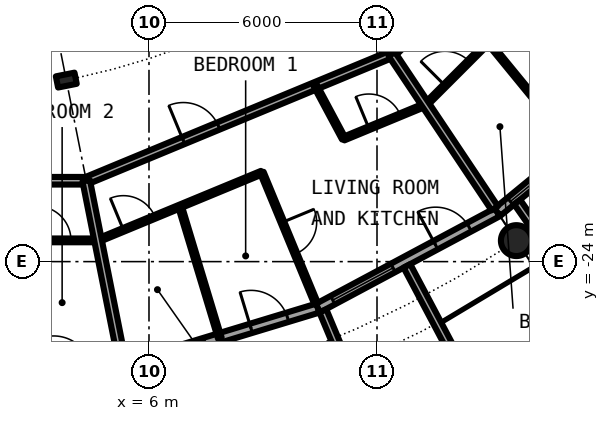
"""IFC4 building model, lengths in metres.
Left out: names, types, materials, properties, quantities, classifications, styles, units other than length and angle.
Written with IfcOpenShell. Run it as: python <this file> out.ifc"""

import sys

from ifc_helpers import new_model, si_unit, direction, frame, frame_2d, origin, origin_2d, place, context, subcontext, project, spatial, rectangle, hollow_circle, i_section, extrude, element, fill, save


model = new_model("IFC4")
c1 = context("Model", 3, precision=1e-05, world=origin(), true_north=direction((0.0, 1.0)))
c2 = subcontext(c1, "Body", "Model", "MODEL_VIEW")
j1 = project(units=[si_unit("LENGTHUNIT", "METRE"), si_unit("PLANEANGLEUNIT", "RADIAN")], contexts=[c1])
p1 = place(None, origin())
s1 = spatial("IfcSite", under=j1, at=p1, CompositionType="ELEMENT")
p2 = place(p1, origin())
s2 = spatial("IfcBuilding", under=s1, at=p2, CompositionType="ELEMENT")
p3 = place(p2, frame((0.0, 0.0, 167.7)))
s3 = spatial("IfcBuildingStorey", under=s2, at=p3, CompositionType="ELEMENT", Elevation=167.7)
p4 = place(p3, frame((15.667, -23.448, 0.0), z_axis=(0.0, 0.0, 1.0), x_axis=(1.0, 0.0, 0.0)))
e1 = element("IfcColumn", 1, at=p4, inside=s3, PredefinedType="COLUMN", context=c2, shape_type="SweptSolid", body=[
    extrude(hollow_circle(Radius=0.406, WallThickness=0.04, at=origin_2d()), origin(), (0.0, 0.0, 1.0), 3.05),
])
p5 = place(p3, frame((3.824, -19.223, 0.0), z_axis=(0.0, 0.0, 1.0), x_axis=(0.195090322016, -0.980785280403, 0.0)))
e2 = element("IfcColumn", 2, at=p5, inside=s3, PredefinedType="COLUMN", context=c2, shape_type="SweptSolid", body=[
    extrude(i_section(OverallWidth=0.3, OverallDepth=0.5, WebThickness=0.014, FlangeThickness=0.028, FilletRadius=0.027, at=origin_2d()), origin(), (0.0, 0.0, 1.0), 3.05),
])
p6 = place(p3, frame((5.326, -26.775, 0.0), z_axis=(0.0, 0.0, 1.0), x_axis=(0.956965678721, 0.290201119486, 0.0)))
e3 = element("IfcWall", 3, at=p6, inside=s3, PredefinedType="SOLIDWALL", context=c2, shape_type="SweptSolid", body=[
    extrude(rectangle(XDim=5.351, YDim=0.25, at=frame_2d((2.676, 0.0))), origin(), (0.0, 0.0, 1.0), 2.7),
])
p7 = place(p6, frame((0.441, 0.0, 0.3)))
e4 = element("IfcOpeningElement", 4, at=p7, cuts=e3, PredefinedType="OPENING", context=c2, shape_type="SweptSolid", body=[
    extrude(rectangle(XDim=1.8, YDim=2.1, at=frame_2d((0.9, 1.05))), frame((0.0, 0.135, 0.0), z_axis=(0.0, -1.0, 0.0), x_axis=(1.0, 0.0, 0.0)), (0.0, 0.0, 1.0), 0.27),
])
p8 = place(p6, frame((3.51, 0.0, 0.0)))
e5 = element("IfcOpeningElement", 5, at=p8, cuts=e3, PredefinedType="OPENING", context=c2, shape_type="SweptSolid", body=[
    extrude(rectangle(XDim=1.0, YDim=2.2, at=frame_2d((0.5, 1.1))), frame((0.0, 0.135, 0.0), z_axis=(0.0, -1.0, 0.0), x_axis=(1.0, 0.0, 0.0)), (0.0, 0.0, 1.0), 0.27),
])
p9 = place(p3, frame((10.447, -25.222, 0.0), z_axis=(0.0, 0.0, 1.0), x_axis=(0.881915646801, 0.471407246368, 0.0)))
e6 = element("IfcWall", 6, at=p9, inside=s3, PredefinedType="SOLIDWALL", context=c2, shape_type="SweptSolid", body=[
    extrude(rectangle(XDim=5.352, YDim=0.25, at=frame_2d((2.676, 0.0))), origin(), (0.0, 0.0, 1.0), 2.7),
])
p10 = place(p9, frame((0.441, 0.0, 0.3)))
e7 = element("IfcOpeningElement", 7, at=p10, cuts=e6, PredefinedType="OPENING", context=c2, shape_type="SweptSolid", body=[
    extrude(rectangle(XDim=1.8, YDim=2.1, at=frame_2d((0.9, 1.05))), frame((0.0, 0.135, 0.0), z_axis=(0.0, -1.0, 0.0), x_axis=(1.0, 0.0, 0.0)), (0.0, 0.0, 1.0), 0.27),
])
p11 = place(p9, frame((3.51, 0.0, 0.0)))
e8 = element("IfcOpeningElement", 8, at=p11, cuts=e6, PredefinedType="OPENING", context=c2, shape_type="SweptSolid", body=[
    extrude(rectangle(XDim=1.0, YDim=2.2, at=frame_2d((0.5, 1.1))), frame((0.0, 0.135, 0.0), z_axis=(0.0, -1.0, 0.0), x_axis=(1.0, 0.0, 0.0)), (0.0, 0.0, 1.0), 0.27),
])
p12 = place(p3, frame((10.575, -25.295, -0.03), z_axis=(0.0, 0.0, 1.0), x_axis=(0.385697364644, -0.922625353492, 0.0)))
e9 = element("IfcWall", 9, at=p12, inside=s3, PredefinedType="SOLIDWALL", context=c2, shape_type="SweptSolid", body=[
    extrude(rectangle(XDim=2.883, YDim=0.2, at=frame_2d((1.442, 0.0))), origin(), (0.0, 0.0, 1.0), 2.73),
])
p13 = place(p3, frame((12.787, -24.113, -0.03), z_axis=(0.0, 0.0, 1.0), x_axis=(0.468365282436, -0.883534924159, 0.0)))
e10 = element("IfcWall", 10, at=p13, inside=s3, PredefinedType="SOLIDWALL", context=c2, shape_type="SweptSolid", body=[
    extrude(rectangle(XDim=3.006, YDim=0.2, at=frame_2d((1.503, 0.0))), origin(), (0.0, 0.0, 1.0), 2.73),
])
p14 = place(p3, frame((15.167, -22.699, 0.0), z_axis=(0.0, 0.0, 1.0), x_axis=(0.773019449054, 0.634382322723, 0.0)))
e11 = element("IfcWall", 11, at=p14, inside=s3, PredefinedType="SOLIDWALL", context=c2, shape_type="SweptSolid", body=[
    extrude(rectangle(XDim=5.352, YDim=0.25, at=frame_2d((2.676, 0.0))), origin(), (0.0, 0.0, 1.0), 2.7),
])
p15 = place(p14, frame((0.441, 0.0, 0.3)))
e12 = element("IfcOpeningElement", 12, at=p15, cuts=e11, PredefinedType="OPENING", context=c2, shape_type="SweptSolid", body=[
    extrude(rectangle(XDim=1.8, YDim=2.1, at=frame_2d((0.9, 1.05))), frame((0.0, 0.135, 0.0), z_axis=(0.0, -1.0, 0.0), x_axis=(1.0, 0.0, 0.0)), (0.0, 0.0, 1.0), 0.27),
])
p16 = place(p14, frame((3.51, 0.0, 0.0)))
e13 = element("IfcOpeningElement", 13, at=p16, cuts=e11, PredefinedType="OPENING", context=c2, shape_type="SweptSolid", body=[
    extrude(rectangle(XDim=1.0, YDim=2.2, at=frame_2d((0.5, 1.1))), frame((0.0, 0.135, 0.0), z_axis=(0.0, -1.0, 0.0), x_axis=(1.0, 0.0, 0.0)), (0.0, 0.0, 1.0), 0.27),
])
p17 = place(p3, frame((15.688, -22.433, -0.03), z_axis=(0.0, 0.0, 1.0), x_axis=(0.573260687834, -0.819373043115, 0.0)))
e14 = element("IfcWall", 14, at=p17, inside=s3, PredefinedType="SOLIDWALL", context=c2, shape_type="SweptSolid", body=[
    extrude(rectangle(XDim=2.925, YDim=0.2, at=frame_2d((1.463, 0.0))), origin(), (0.0, 0.0, 1.0), 2.73),
])
p18 = place(p3, frame((0.0, -23.441, 0.0), z_axis=(0.0, 0.0, 1.0), x_axis=(1.0, 0.0, 0.0)))
e15 = element("IfcWall", 15, at=p18, inside=s3, PredefinedType="PARTITIONING", context=c2, shape_type="SweptSolid", body=[
    extrude(rectangle(XDim=4.663, YDim=0.1, at=frame_2d((2.332, 0.0))), origin(), (0.0, 0.0, 1.0), 2.7),
])
p19 = place(p18, frame((3.047, 0.0, 0.0)))
e16 = element("IfcOpeningElement", 16, at=p19, cuts=e15, PredefinedType="OPENING", context=c2, shape_type="SweptSolid", body=[
    extrude(rectangle(XDim=0.9, YDim=2.3, at=frame_2d((0.45, 1.15))), frame((0.0, 0.06, 0.0), z_axis=(0.0, -1.0, 0.0), x_axis=(1.0, 0.0, 0.0)), (0.0, 0.0, 1.0), 0.12),
])
p20 = place(p3, frame((4.656, -23.442, 0.0), z_axis=(0.0, 0.0, 1.0), x_axis=(0.923994503548, 0.382405749712, 0.0)))
e17 = element("IfcWall", 17, at=p20, inside=s3, PredefinedType="PARTITIONING", context=c2, shape_type="SweptSolid", body=[
    extrude(rectangle(XDim=4.663, YDim=0.1, at=frame_2d((2.331, 0.0))), origin(), (0.0, 0.0, 1.0), 2.7),
])
p21 = place(p20, frame((0.726, 0.0, 0.0)))
e18 = element("IfcOpeningElement", 18, at=p21, cuts=e17, PredefinedType="OPENING", context=c2, shape_type="SweptSolid", body=[
    extrude(rectangle(XDim=0.9, YDim=2.3, at=frame_2d((0.45, 1.15))), frame((0.0, 0.06, 0.0), z_axis=(0.0, -1.0, 0.0), x_axis=(1.0, 0.0, 0.0)), (0.0, 0.0, 1.0), 0.12),
])
p22 = place(p3, frame((11.124, -20.764, 0.0), z_axis=(0.0, 0.0, 1.0), x_axis=(0.923938991376, 0.382539854414, 0.0)))
e19 = element("IfcWall", 19, at=p22, inside=s3, PredefinedType="PARTITIONING", context=c2, shape_type="SweptSolid", body=[
    extrude(rectangle(XDim=2.331, YDim=0.1, at=frame_2d((1.166, 0.0))), origin(), (0.0, 0.0, 1.0), 2.7),
])
p23 = place(p22, frame((0.716, 0.0, 0.0)))
e20 = element("IfcOpeningElement", 20, at=p23, cuts=e19, PredefinedType="OPENING", context=c2, shape_type="SweptSolid", body=[
    extrude(rectangle(XDim=0.9, YDim=2.3, at=frame_2d((0.45, 1.15))), frame((0.0, 0.06, 0.0), z_axis=(0.0, -1.0, 0.0), x_axis=(1.0, 0.0, 0.0)), (0.0, 0.0, 1.0), 0.12),
])
p24 = place(p3, frame((13.285, -19.869, 0.0), z_axis=(0.0, 0.0, 1.0), x_axis=(0.706923494552, 0.707290020325, 0.0)))
e21 = element("IfcWall", 21, at=p24, inside=s3, PredefinedType="PARTITIONING", context=c2, shape_type="SweptSolid", body=[
    extrude(rectangle(XDim=4.663, YDim=0.1, at=frame_2d((2.331, 0.0))), origin(), (0.0, 0.0, 1.0), 2.7),
])
p25 = place(p24, frame((0.712, 0.0, 0.0)))
e22 = element("IfcOpeningElement", 22, at=p25, cuts=e21, PredefinedType="OPENING", context=c2, shape_type="SweptSolid", body=[
    extrude(rectangle(XDim=0.9, YDim=2.3, at=frame_2d((0.45, 1.15))), frame((0.0, 0.06, 0.0), z_axis=(0.0, -1.0, 0.0), x_axis=(1.0, 0.0, 0.0)), (0.0, 0.0, 1.0), 0.12),
])
p26 = place(p3, frame((-4.351, -21.872, 0.0), z_axis=(0.0, 0.0, 1.0), x_axis=(1.0, 0.0, 0.0)))
e23 = element("IfcWall", 23, at=p26, inside=s3, PredefinedType="PARTITIONING", context=c2, shape_type="SweptSolid", body=[
    extrude(rectangle(XDim=8.702, YDim=0.2, at=frame_2d((4.351, 0.0))), origin(), (0.0, 0.0, 1.0), 2.7),
])
p27 = place(p26, frame((4.939, 0.0, 0.0)))
e24 = element("IfcOpeningElement", 24, at=p27, cuts=e23, PredefinedType="OPENING", context=c2, shape_type="SweptSolid", body=[
    extrude(rectangle(XDim=1.0, YDim=2.3, at=frame_2d((0.5, 1.15))), frame((0.0, 0.11, 0.0), z_axis=(0.0, -1.0, 0.0), x_axis=(1.0, 0.0, 0.0)), (0.0, 0.0, 1.0), 0.22),
])
p28 = place(p3, frame((4.351, -21.872, 0.0), z_axis=(0.0, 0.0, 1.0), x_axis=(0.923825356298, 0.382814199136, 0.0)))
e25 = element("IfcWall", 25, at=p28, inside=s3, PredefinedType="PARTITIONING", context=c2, shape_type="SweptSolid", body=[
    extrude(rectangle(XDim=8.704, YDim=0.2, at=frame_2d((4.352, 0.0))), origin(), (0.0, 0.0, 1.0), 2.7),
])
p29 = place(p28, frame((2.763, 0.0, 0.0)))
e26 = element("IfcOpeningElement", 26, at=p29, cuts=e25, PredefinedType="OPENING", context=c2, shape_type="SweptSolid", body=[
    extrude(rectangle(XDim=1.0, YDim=2.3, at=frame_2d((0.5, 1.15))), frame((0.0, 0.11, 0.0), z_axis=(0.0, -1.0, 0.0), x_axis=(1.0, 0.0, 0.0)), (0.0, 0.0, 1.0), 0.22),
])
p30 = place(p3, frame((12.389, -18.542, 0.0), z_axis=(0.0, 0.0, 1.0), x_axis=(0.707106781187, 0.707106781187, 0.0)))
e27 = element("IfcWall", 27, at=p30, inside=s3, PredefinedType="PARTITIONING", context=c2, shape_type="SweptSolid", body=[
    extrude(rectangle(XDim=8.702, YDim=0.2, at=frame_2d((4.351, 0.0))), origin(), (0.0, 0.0, 1.0), 2.7),
])
p31 = place(p30, frame((2.763, 0.0, 0.0)))
e28 = element("IfcOpeningElement", 28, at=p31, cuts=e27, PredefinedType="OPENING", context=c2, shape_type="SweptSolid", body=[
    extrude(rectangle(XDim=1.0, YDim=2.3, at=frame_2d((0.5, 1.15))), frame((0.0, 0.11, 0.0), z_axis=(0.0, -1.0, 0.0), x_axis=(1.0, 0.0, 0.0)), (0.0, 0.0, 1.0), 0.22),
])
p32 = place(p3, frame((4.348, -21.873, 0.0), z_axis=(0.0, 0.0, 1.0), x_axis=(0.194931286287, -0.980816901173, 0.0)))
e29 = element("IfcWall", 29, at=p32, inside=s3, PredefinedType="PARTITIONING", context=c2, shape_type="SweptSolid", body=[
    extrude(rectangle(XDim=4.875, YDim=0.2, at=frame_2d((2.437, 0.0))), origin(), (0.0, 0.0, 1.0), 2.7),
])
p33 = place(p3, frame((6.817, -22.549, 0.0), z_axis=(0.0, 0.0, 1.0), x_axis=(0.289439829793, -0.957196210256, 0.0)))
e30 = element("IfcWall", 30, at=p33, inside=s3, PredefinedType="PARTITIONING", context=c2, shape_type="SweptSolid", body=[
    extrude(rectangle(XDim=3.618, YDim=0.1, at=frame_2d((1.809, 0.0))), origin(), (0.0, 0.0, 1.0), 2.7),
])
p34 = place(p3, frame((8.97, -21.656, 0.0), z_axis=(0.0, 0.0, 1.0), x_axis=(0.382669377748, -0.923885353999, 0.0)))
e31 = element("IfcWall", 31, at=p34, inside=s3, PredefinedType="PARTITIONING", context=c2, shape_type="SweptSolid", body=[
    extrude(rectangle(XDim=3.734, YDim=0.1, at=frame_2d((1.867, 0.0))), origin(), (0.0, 0.0, 1.0), 2.7),
])
p35 = place(p34, frame((1.417, 0.0, 0.0)))
e32 = element("IfcOpeningElement", 32, at=p35, cuts=e31, PredefinedType="OPENING", context=c2, shape_type="SweptSolid", body=[
    extrude(rectangle(XDim=0.9, YDim=2.3, at=frame_2d((0.45, 1.15))), frame((0.0, 0.06, 0.0), z_axis=(0.0, -1.0, 0.0), x_axis=(1.0, 0.0, 0.0)), (0.0, 0.0, 1.0), 0.12),
])
p36 = place(p3, frame((10.38, -19.374, 0.0), z_axis=(0.0, 0.0, 1.0), x_axis=(0.472002235476, -0.881597351236, 0.0)))
e33 = element("IfcWall", 33, at=p36, inside=s3, PredefinedType="PARTITIONING", context=c2, shape_type="SweptSolid", body=[
    extrude(rectangle(XDim=1.577, YDim=0.1, at=frame_2d((0.788, 0.0))), origin(), (0.0, 0.0, 1.0), 2.7),
])
p37 = place(p3, frame((12.389, -18.542, 0.0), z_axis=(0.0, 0.0, 1.0), x_axis=(0.55569370664, -0.831387096605, 0.0)))
e34 = element("IfcWall", 34, at=p37, inside=s3, PredefinedType="PARTITIONING", context=c2, shape_type="SweptSolid", body=[
    extrude(rectangle(XDim=4.875, YDim=0.2, at=frame_2d((2.438, 0.0))), origin(), (0.0, 0.0, 1.0), 2.7),
])
p38 = place(p3, frame((14.927, -18.224, 0.0), z_axis=(0.0, 0.0, 1.0), x_axis=(0.633737383709, -0.773548271597, 0.0)))
e35 = element("IfcWall", 35, at=p38, inside=s3, PredefinedType="PARTITIONING", context=c2, shape_type="SweptSolid", body=[
    extrude(rectangle(XDim=3.618, YDim=0.1, at=frame_2d((1.809, 0.0))), origin(), (0.0, 0.0, 1.0), 2.7),
])
p39 = place(p8, origin())
e36 = element("IfcDoor", 36, at=p39, inside=s3, OperationType="SINGLE_SWING_LEFT", PredefinedType="DOOR", context=c2, shape_type="SweptSolid", body=[
    extrude(rectangle(XDim=1.0, YDim=2.2, at=frame_2d((0.5, 1.1))), frame((0.0, 0.025, 0.0), z_axis=(0.0, -1.0, 0.0), x_axis=(1.0, 0.0, 0.0)), (0.0, 0.0, 1.0), 0.05),
])
fill(e5, e36)
p40 = place(p10, origin())
e37 = element("IfcWindow", 37, at=p40, inside=s3, PartitioningType="SINGLE_PANEL", PredefinedType="WINDOW", context=c2, shape_type="SweptSolid", body=[
    extrude(rectangle(XDim=1.8, YDim=2.1, at=frame_2d((0.9, 1.05))), frame((0.0, 0.03, 0.0), z_axis=(0.0, -1.0, 0.0), x_axis=(1.0, 0.0, 0.0)), (0.0, 0.0, 1.0), 0.06),
])
fill(e7, e37)
p41 = place(p11, origin())
e38 = element("IfcDoor", 38, at=p41, inside=s3, OperationType="SINGLE_SWING_LEFT", PredefinedType="DOOR", context=c2, shape_type="SweptSolid", body=[
    extrude(rectangle(XDim=1.0, YDim=2.2, at=frame_2d((0.5, 1.1))), frame((0.0, 0.025, 0.0), z_axis=(0.0, -1.0, 0.0), x_axis=(1.0, 0.0, 0.0)), (0.0, 0.0, 1.0), 0.05),
])
fill(e8, e38)
p42 = place(p15, origin())
e39 = element("IfcWindow", 39, at=p42, inside=s3, PartitioningType="SINGLE_PANEL", PredefinedType="WINDOW", context=c2, shape_type="SweptSolid", body=[
    extrude(rectangle(XDim=1.8, YDim=2.1, at=frame_2d((0.9, 1.05))), frame((0.0, 0.03, 0.0), z_axis=(0.0, -1.0, 0.0), x_axis=(1.0, 0.0, 0.0)), (0.0, 0.0, 1.0), 0.06),
])
fill(e12, e39)
p43 = place(p19, origin())
e40 = element("IfcDoor", 40, at=p43, inside=s3, OperationType="SINGLE_SWING_RIGHT", PredefinedType="DOOR", context=c2, shape_type="SweptSolid", body=[
    extrude(rectangle(XDim=0.9, YDim=2.3, at=frame_2d((0.45, 1.15))), frame((0.0, 0.025, 0.0), z_axis=(0.0, -1.0, 0.0), x_axis=(1.0, 0.0, 0.0)), (0.0, 0.0, 1.0), 0.05),
])
fill(e16, e40)
p44 = place(p29, origin())
e41 = element("IfcDoor", 41, at=p44, inside=s3, OperationType="SINGLE_SWING_LEFT", PredefinedType="DOOR", context=c2, shape_type="SweptSolid", body=[
    extrude(rectangle(XDim=1.0, YDim=2.3, at=frame_2d((0.5, 1.15))), frame((0.0, 0.025, 0.0), z_axis=(0.0, -1.0, 0.0), x_axis=(1.0, 0.0, 0.0)), (0.0, 0.0, 1.0), 0.05),
])
fill(e26, e41)
p45 = place(p23, origin())
e42 = element("IfcDoor", 42, at=p45, inside=s3, OperationType="SINGLE_SWING_RIGHT", PredefinedType="DOOR", context=c2, shape_type="SweptSolid", body=[
    extrude(rectangle(XDim=0.9, YDim=2.3, at=frame_2d((0.45, 1.15))), frame((0.0, 0.025, 0.0), z_axis=(0.0, -1.0, 0.0), x_axis=(1.0, 0.0, 0.0)), (0.0, 0.0, 1.0), 0.05),
])
fill(e20, e42)
p46 = place(p35, origin())
e43 = element("IfcDoor", 43, at=p46, inside=s3, OperationType="SINGLE_SWING_RIGHT", PredefinedType="DOOR", context=c2, shape_type="SweptSolid", body=[
    extrude(rectangle(XDim=0.9, YDim=2.3, at=frame_2d((0.45, 1.15))), frame((0.0, 0.025, 0.0), z_axis=(0.0, -1.0, 0.0), x_axis=(1.0, 0.0, 0.0)), (0.0, 0.0, 1.0), 0.05),
])
fill(e32, e43)
p47 = place(p21, origin())
e44 = element("IfcDoor", 44, at=p47, inside=s3, OperationType="SINGLE_SWING_LEFT", PredefinedType="DOOR", context=c2, shape_type="SweptSolid", body=[
    extrude(rectangle(XDim=0.9, YDim=2.3, at=frame_2d((0.45, 1.15))), frame((0.0, 0.025, 0.0), z_axis=(0.0, -1.0, 0.0), x_axis=(1.0, 0.0, 0.0)), (0.0, 0.0, 1.0), 0.05),
])
fill(e18, e44)
p48 = place(p25, origin())
e45 = element("IfcDoor", 45, at=p48, inside=s3, OperationType="SINGLE_SWING_LEFT", PredefinedType="DOOR", context=c2, shape_type="SweptSolid", body=[
    extrude(rectangle(XDim=0.9, YDim=2.3, at=frame_2d((0.45, 1.15))), frame((0.0, 0.025, 0.0), z_axis=(0.0, -1.0, 0.0), x_axis=(1.0, 0.0, 0.0)), (0.0, 0.0, 1.0), 0.05),
])
fill(e22, e45)
save(model, sys.argv[1])
